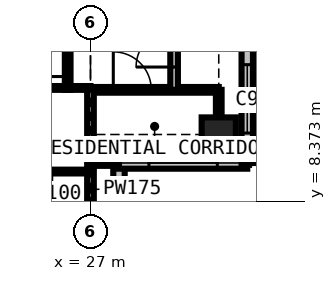
"""IFC4 building model, lengths in metres.
Left out: names, types, materials, properties, quantities, classifications, styles, units other than length and angle.
Written with IfcOpenShell. Run it as: python <this file> out.ifc"""

import sys

from ifc_helpers import new_model, si_unit, direction, frame, frame_2d, origin, origin_2d, place, context, subcontext, project, spatial, rectangle, extrude, element, fill, save


model = new_model("IFC4")
c1 = context("Model", 3, precision=1e-05, world=origin(), true_north=direction((0.0, 1.0)))
c2 = subcontext(c1, "Body", "Model", "MODEL_VIEW")
j1 = project(units=[si_unit("LENGTHUNIT", "METRE"), si_unit("PLANEANGLEUNIT", "RADIAN")], contexts=[c1])
p1 = place(None, origin())
s1 = spatial("IfcSite", under=j1, at=p1, CompositionType="ELEMENT")
p2 = place(p1, origin())
s2 = spatial("IfcBuilding", under=s1, at=p2, CompositionType="ELEMENT")
p3 = place(p2, frame((0.0, 0.0, 225.9)))
s3 = spatial("IfcBuildingStorey", under=s2, at=p3, CompositionType="ELEMENT", Elevation=225.9)
p4 = place(p3, frame((30.375, 10.125, 0.0), z_axis=(0.0, 0.0, 1.0), x_axis=(1.0, 0.0, 0.0)))
e1 = element("IfcColumn", 1, at=p4, inside=s3, PredefinedType="COLUMN", context=c2, shape_type="SweptSolid", body=[
    extrude(rectangle(XDim=0.9, YDim=0.9, at=origin_2d()), origin(), (0.0, 0.0, 1.0), 3.6),
])
p5 = place(p3, frame((27.75, 6.0, 0.0), z_axis=(0.0, 0.0, 1.0), x_axis=(0.0, 1.0, 0.0)))
e2 = element("IfcWall", 2, at=p5, inside=s3, PredefinedType="SOLIDWALL", context=c2, shape_type="SweptSolid", body=[
    extrude(rectangle(XDim=3.375, YDim=0.3, at=frame_2d((1.688, 0.0))), origin(), (0.0, 0.0, 1.0), 3.375),
])
p6 = place(p5, frame((0.788, 0.0, 0.6)))
e3 = element("IfcOpeningElement", 3, at=p6, cuts=e2, PredefinedType="OPENING", context=c2, shape_type="SweptSolid", body=[
    extrude(rectangle(XDim=1.8, YDim=2.1, at=frame_2d((0.9, 1.05))), frame((0.0, 0.16, 0.0), z_axis=(0.0, -1.0, 0.0), x_axis=(1.0, 0.0, 0.0)), (0.0, 0.0, 1.0), 0.32),
])
p7 = place(p3, frame((27.75, 9.375, 0.0), z_axis=(0.0, 0.0, 1.0), x_axis=(1.0, 0.0, 0.0)))
e4 = element("IfcWall", 4, at=p7, inside=s3, PredefinedType="SOLIDWALL", context=c2, shape_type="SweptSolid", body=[
    extrude(rectangle(XDim=3.375, YDim=0.3, at=frame_2d((1.688, 0.0))), origin(), (0.0, 0.0, 1.0), 3.375),
])
p8 = place(p7, frame((0.788, 0.0, 0.6)))
e5 = element("IfcOpeningElement", 5, at=p8, cuts=e4, PredefinedType="OPENING", context=c2, shape_type="SweptSolid", body=[
    extrude(rectangle(XDim=1.8, YDim=2.1, at=frame_2d((0.9, 1.05))), frame((0.0, 0.16, 0.0), z_axis=(0.0, -1.0, 0.0), x_axis=(1.0, 0.0, 0.0)), (0.0, 0.0, 1.0), 0.32),
])
p9 = place(p3, frame((31.125, 9.375, 0.0), z_axis=(0.0, 0.0, 1.0), x_axis=(0.0, 1.0, 0.0)))
e6 = element("IfcWall", 6, at=p9, inside=s3, PredefinedType="SOLIDWALL", context=c2, shape_type="SweptSolid", body=[
    extrude(rectangle(XDim=3.375, YDim=0.3, at=frame_2d((1.688, 0.0))), origin(), (0.0, 0.0, 1.0), 3.375),
])
p10 = place(p9, frame((0.788, 0.0, 0.6)))
e7 = element("IfcOpeningElement", 7, at=p10, cuts=e6, PredefinedType="OPENING", context=c2, shape_type="SweptSolid", body=[
    extrude(rectangle(XDim=1.8, YDim=2.1, at=frame_2d((0.9, 1.05))), frame((0.0, 0.16, 0.0), z_axis=(0.0, -1.0, 0.0), x_axis=(1.0, 0.0, 0.0)), (0.0, 0.0, 1.0), 0.32),
])
p11 = place(p3, frame((23.625, 11.35, 0.0), z_axis=(0.0, 0.0, 1.0), x_axis=(1.0, 0.0, 0.0)))
e8 = element("IfcWall", 8, at=p11, inside=s3, PredefinedType="PARTITIONING", context=c2, shape_type="SweptSolid", body=[
    extrude(rectangle(XDim=3.375, YDim=0.1, at=frame_2d((1.688, 0.0))), origin(), (0.0, 0.0, 1.0), 3.375),
])
p12 = place(p11, frame((0.2, 0.0, 0.0)))
e9 = element("IfcOpeningElement", 9, at=p12, cuts=e8, PredefinedType="OPENING", context=c2, shape_type="SweptSolid", body=[
    extrude(rectangle(XDim=0.95, YDim=2.2, at=frame_2d((0.475, 1.1))), frame((0.0, 0.06, 0.0), z_axis=(0.0, -1.0, 0.0), x_axis=(1.0, 0.0, 0.0)), (0.0, 0.0, 1.0), 0.12),
])
p13 = place(p3, frame((25.0, 9.15, 0.0), z_axis=(0.0, 0.0, 1.0), x_axis=(1.0, 0.0, 0.0)))
e10 = element("IfcWall", 10, at=p13, inside=s3, PredefinedType="PARTITIONING", context=c2, shape_type="SweptSolid", body=[
    extrude(rectangle(XDim=2.0, YDim=0.1, at=frame_2d((1.0, 0.0))), origin(), (0.0, 0.0, 1.0), 3.375),
])
p14 = place(p3, frame((26.4, 11.3, 0.0), z_axis=(0.0, 0.0, 1.0), x_axis=(0.0, 1.0, 0.0)))
e11 = element("IfcWall", 11, at=p14, inside=s3, PredefinedType="PARTITIONING", context=c2, shape_type="SweptSolid", body=[
    extrude(rectangle(XDim=1.6, YDim=0.15, at=frame_2d((0.8, 0.0))), origin(), (0.0, 0.0, 1.0), 3.375),
])
p15 = place(p14, frame((0.35, 0.0, 0.0)))
e12 = element("IfcOpeningElement", 12, at=p15, cuts=e11, PredefinedType="OPENING", context=c2, shape_type="SweptSolid", body=[
    extrude(rectangle(XDim=1.0, YDim=2.2, at=frame_2d((0.5, 1.1))), frame((0.0, 0.085, 0.0), z_axis=(0.0, -1.0, 0.0), x_axis=(1.0, 0.0, 0.0)), (0.0, 0.0, 1.0), 0.17),
])
p16 = place(p3, frame((27.0, 11.3, 0.0), z_axis=(0.0, 0.0, 1.0), x_axis=(1.0, 0.0, 0.0)))
e13 = element("IfcWall", 13, at=p16, inside=s3, PredefinedType="PARTITIONING", context=c2, shape_type="SweptSolid", body=[
    extrude(rectangle(XDim=3.375, YDim=0.15, at=frame_2d((1.688, 0.0))), origin(), (0.0, 0.0, 1.0), 3.375),
])
p17 = place(p16, frame((0.6, 0.0, 0.0)))
e14 = element("IfcOpeningElement", 14, at=p17, cuts=e13, PredefinedType="OPENING", context=c2, shape_type="SweptSolid", body=[
    extrude(rectangle(XDim=1.0, YDim=2.2, at=frame_2d((0.5, 1.1))), frame((0.0, 0.085, 0.0), z_axis=(0.0, -1.0, 0.0), x_axis=(1.0, 0.0, 0.0)), (0.0, 0.0, 1.0), 0.17),
])
p18 = place(p3, frame((27.0, 6.016, 0.0), z_axis=(0.0, 0.0, 1.0), x_axis=(0.0, 1.0, 0.0)))
e15 = element("IfcWall", 15, at=p18, inside=s3, PredefinedType="PARTITIONING", context=c2, shape_type="SweptSolid", body=[
    extrude(rectangle(XDim=5.334, YDim=0.175, at=frame_2d((2.667, 0.0))), origin(), (0.0, 0.0, 1.0), 2.877),
])
p19 = place(p3, frame((27.0, 9.375, 0.0), z_axis=(0.0, 0.0, 1.0), x_axis=(1.0, 0.0, 0.0)))
e16 = element("IfcWall", 16, at=p19, inside=s3, PredefinedType="PARTITIONING", context=c2, shape_type="SweptSolid", body=[
    extrude(rectangle(XDim=0.734, YDim=0.15, at=frame_2d((0.367, 0.0))), origin(), (0.0, 0.0, 1.0), 3.375),
])
p20 = place(p3, frame((29.2, 11.3, 0.0), z_axis=(0.0, 0.0, 1.0), x_axis=(0.0, 1.0, 0.0)))
e17 = element("IfcWall", 17, at=p20, inside=s3, PredefinedType="PARTITIONING", context=c2, shape_type="SweptSolid", body=[
    extrude(rectangle(XDim=17.9, YDim=0.2, at=frame_2d((8.95, 0.0))), origin(), (0.0, 0.0, 1.0), 3.375),
])
p21 = place(p20, frame((0.6, 0.0, 0.0)))
e18 = element("IfcOpeningElement", 18, at=p21, cuts=e17, PredefinedType="OPENING", context=c2, shape_type="SweptSolid", body=[
    extrude(rectangle(XDim=1.0, YDim=2.2, at=frame_2d((0.5, 1.1))), frame((0.0, 0.11, 0.0), z_axis=(0.0, -1.0, 0.0), x_axis=(1.0, 0.0, 0.0)), (0.0, 0.0, 1.0), 0.22),
])
p22 = place(p20, frame((2.4, 0.0, 0.0)))
e19 = element("IfcOpeningElement", 19, at=p22, cuts=e17, PredefinedType="OPENING", context=c2, shape_type="SweptSolid", body=[
    extrude(rectangle(XDim=0.95, YDim=2.2, at=frame_2d((0.475, 1.1))), frame((0.0, 0.11, 0.0), z_axis=(0.0, -1.0, 0.0), x_axis=(1.0, 0.0, 0.0)), (0.0, 0.0, 1.0), 0.22),
])
p23 = place(p20, frame((5.825, 0.0, 0.0)))
e20 = element("IfcOpeningElement", 20, at=p23, cuts=e17, PredefinedType="OPENING", context=c2, shape_type="SweptSolid", body=[
    extrude(rectangle(XDim=0.95, YDim=2.2, at=frame_2d((0.475, 1.1))), frame((0.0, 0.11, 0.0), z_axis=(0.0, -1.0, 0.0), x_axis=(1.0, 0.0, 0.0)), (0.0, 0.0, 1.0), 0.22),
])
p24 = place(p20, frame((9.2, 0.0, 0.0)))
e21 = element("IfcOpeningElement", 21, at=p24, cuts=e17, PredefinedType="OPENING", context=c2, shape_type="SweptSolid", body=[
    extrude(rectangle(XDim=0.95, YDim=2.2, at=frame_2d((0.475, 1.1))), frame((0.0, 0.11, 0.0), z_axis=(0.0, -1.0, 0.0), x_axis=(1.0, 0.0, 0.0)), (0.0, 0.0, 1.0), 0.22),
])
p25 = place(p20, frame((12.575, 0.0, 0.0)))
e22 = element("IfcOpeningElement", 22, at=p25, cuts=e17, PredefinedType="OPENING", context=c2, shape_type="SweptSolid", body=[
    extrude(rectangle(XDim=0.95, YDim=2.2, at=frame_2d((0.475, 1.1))), frame((0.0, 0.11, 0.0), z_axis=(0.0, -1.0, 0.0), x_axis=(1.0, 0.0, 0.0)), (0.0, 0.0, 1.0), 0.22),
])
p26 = place(p20, frame((16.3, 0.0, 0.0)))
e23 = element("IfcOpeningElement", 23, at=p26, cuts=e17, PredefinedType="OPENING", context=c2, shape_type="SweptSolid", body=[
    extrude(rectangle(XDim=1.0, YDim=2.2, at=frame_2d((0.5, 1.1))), frame((0.0, 0.11, 0.0), z_axis=(0.0, -1.0, 0.0), x_axis=(1.0, 0.0, 0.0)), (0.0, 0.0, 1.0), 0.22),
])
p27 = place(p3, frame((30.375, 9.525, 0.0), z_axis=(0.0, 0.0, 1.0), x_axis=(0.0, 1.0, 0.0)))
e24 = element("IfcWall", 24, at=p27, inside=s3, PredefinedType="PARTITIONING", context=c2, shape_type="SweptSolid", body=[
    extrude(rectangle(XDim=1.775, YDim=0.15, at=frame_2d((0.888, 0.0))), origin(), (0.0, 0.0, 1.0), 2.877),
])
p28 = place(p6, origin())
e25 = element("IfcWindow", 25, at=p28, inside=s3, PartitioningType="SINGLE_PANEL", PredefinedType="WINDOW", context=c2, shape_type="SweptSolid", body=[
    extrude(rectangle(XDim=1.8, YDim=2.1, at=frame_2d((0.9, 1.05))), frame((0.0, 0.03, 0.0), z_axis=(0.0, -1.0, 0.0), x_axis=(1.0, 0.0, 0.0)), (0.0, 0.0, 1.0), 0.06),
])
fill(e3, e25)
p29 = place(p8, origin())
e26 = element("IfcWindow", 26, at=p29, inside=s3, PartitioningType="SINGLE_PANEL", PredefinedType="WINDOW", context=c2, shape_type="SweptSolid", body=[
    extrude(rectangle(XDim=1.8, YDim=2.1, at=frame_2d((0.9, 1.05))), frame((0.0, 0.03, 0.0), z_axis=(0.0, -1.0, 0.0), x_axis=(1.0, 0.0, 0.0)), (0.0, 0.0, 1.0), 0.06),
])
fill(e5, e26)
p30 = place(p10, origin())
e27 = element("IfcWindow", 27, at=p30, inside=s3, PartitioningType="SINGLE_PANEL", PredefinedType="WINDOW", context=c2, shape_type="SweptSolid", body=[
    extrude(rectangle(XDim=1.8, YDim=2.1, at=frame_2d((0.9, 1.05))), frame((0.0, 0.03, 0.0), z_axis=(0.0, -1.0, 0.0), x_axis=(1.0, 0.0, 0.0)), (0.0, 0.0, 1.0), 0.06),
])
fill(e7, e27)
p31 = place(p17, origin())
e28 = element("IfcDoor", 28, at=p31, inside=s3, OperationType="SINGLE_SWING_LEFT", PredefinedType="DOOR", context=c2, shape_type="SweptSolid", body=[
    extrude(rectangle(XDim=1.0, YDim=2.2, at=frame_2d((0.5, 1.1))), frame((0.0, 0.025, 0.0), z_axis=(0.0, -1.0, 0.0), x_axis=(1.0, 0.0, 0.0)), (0.0, 0.0, 1.0), 0.05),
])
fill(e14, e28)
p32 = place(p15, origin())
e29 = element("IfcDoor", 29, at=p32, inside=s3, OperationType="SINGLE_SWING_LEFT", PredefinedType="DOOR", context=c2, shape_type="SweptSolid", body=[
    extrude(rectangle(XDim=1.0, YDim=2.2, at=frame_2d((0.5, 1.1))), frame((0.0, 0.025, 0.0), z_axis=(0.0, -1.0, 0.0), x_axis=(1.0, 0.0, 0.0)), (0.0, 0.0, 1.0), 0.05),
])
fill(e12, e29)
p33 = place(p21, origin())
e30 = element("IfcDoor", 30, at=p33, inside=s3, OperationType="SINGLE_SWING_LEFT", PredefinedType="DOOR", context=c2, shape_type="SweptSolid", body=[
    extrude(rectangle(XDim=1.0, YDim=2.2, at=frame_2d((0.5, 1.1))), frame((0.0, 0.025, 0.0), z_axis=(0.0, -1.0, 0.0), x_axis=(1.0, 0.0, 0.0)), (0.0, 0.0, 1.0), 0.05),
])
fill(e18, e30)
save(model, sys.argv[1])
